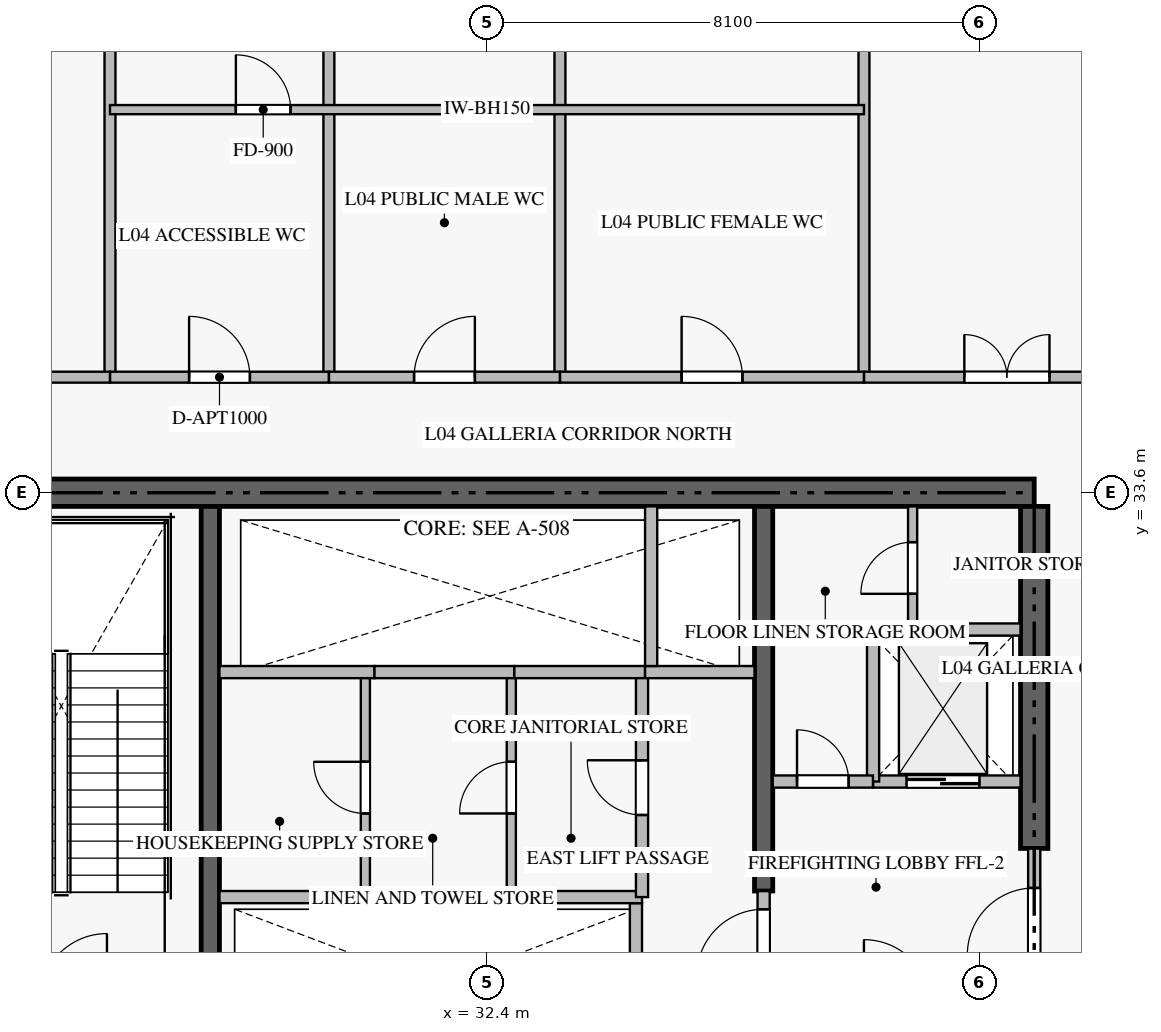
"""IFC4 building model, lengths in metres.
Left out: names, types, materials, properties, quantities, classifications, styles, units other than length and angle.
Written with IfcOpenShell. Run it as: python <this file> out.ifc"""

import sys

from ifc_helpers import new_model, si_unit, direction, frame, frame_2d, origin, place, context, subcontext, project, spatial, rectangle, extrude, source, transform, mapped, element, fill, save


model = new_model("IFC4")
c1 = context("Model", 3, precision=1e-05, world=origin(), true_north=direction((0.0, 1.0)))
c2 = subcontext(c1, "Body", "Model", "MODEL_VIEW")
j1 = project(units=[si_unit("LENGTHUNIT", "METRE"), si_unit("PLANEANGLEUNIT", "RADIAN")], contexts=[c1])
p1 = place(None, origin())
s1 = spatial("IfcSite", under=j1, at=p1, CompositionType="ELEMENT")
p2 = place(p1, origin())
s2 = spatial("IfcBuilding", under=s1, at=p2, CompositionType="ELEMENT")
p3 = place(p2, frame((0.0, 0.0, 21.0)))
s3 = spatial("IfcBuildingStorey", under=s2, at=p3, CompositionType="ELEMENT", Elevation=21.0)
p4 = place(p3, frame((41.4, 33.6, -0.85), z_axis=(0.0, 0.0, 1.0), x_axis=(-1.0, 0.0, 0.0)))
e1 = element("IfcWall", 1, at=p4, inside=s3, PredefinedType="SHEAR", context=c2, shape_type="SweptSolid", body=[
    extrude(rectangle(XDim=18.0, YDim=0.45, at=frame_2d((9.0, 0.0))), origin(), (0.0, 0.0, 1.0), 6.108),
])
p5 = place(p3, frame((41.4, 27.75, -0.85), z_axis=(0.0, 0.0, 1.0), x_axis=(0.0, 1.0, 0.0)))
e2 = element("IfcWall", 2, at=p5, inside=s3, PredefinedType="SHEAR", context=c2, shape_type="SweptSolid", body=[
    extrude(rectangle(XDim=5.625, YDim=0.45, at=frame_2d((2.812, 0.0))), origin(), (0.0, 0.0, 1.0), 6.108),
])
p6 = place(p3, frame((27.85, 23.55, -0.85), z_axis=(0.0, 0.0, 1.0), x_axis=(0.0, 1.0, 0.0)))
e3 = element("IfcWall", 3, at=p6, inside=s3, PredefinedType="SHEAR", context=c2, shape_type="SweptSolid", body=[
    extrude(rectangle(XDim=9.825, YDim=0.3, at=frame_2d((4.913, 0.0))), origin(), (0.0, 0.0, 1.0), 6.108),
])
p7 = place(p3, frame((36.95, 27.05, -0.85), z_axis=(0.0, 0.0, 1.0), x_axis=(0.0, 1.0, 0.0)))
e4 = element("IfcWall", 4, at=p7, inside=s3, PredefinedType="SHEAR", context=c2, shape_type="SweptSolid", body=[
    extrude(rectangle(XDim=6.325, YDim=0.3, at=frame_2d((3.163, 0.0))), origin(), (0.0, 0.0, 1.0), 6.108),
])
p8 = place(p3, frame((38.75, 28.85, 0.0), z_axis=(0.0, 0.0, 1.0), x_axis=(1.0, 0.0, 0.0)))
e5 = element("IfcWall", 5, at=p8, inside=s3, PredefinedType="STANDARD", context=c2, shape_type="SweptSolid", body=[
    extrude(rectangle(XDim=2.425, YDim=0.2, at=frame_2d((1.212, 0.0))), origin(), (0.0, 0.0, 1.0), 5.26),
])
p9 = place(p8, frame((0.55, 0.0, 0.0)))
e6 = element("IfcOpeningElement", 6, at=p9, cuts=e5, PredefinedType="OPENING", context=c2, shape_type="SweptSolid", body=[
    extrude(rectangle(XDim=1.2, YDim=2.2, at=frame_2d((0.6, 1.1))), frame((0.0, 0.11, 0.0), z_axis=(0.0, -1.0, 0.0), x_axis=(1.0, 0.0, 0.0)), (0.0, 0.0, 1.0), 0.22),
])
p10 = place(p3, frame((34.85, 24.35, 0.0), z_axis=(0.0, 0.0, 1.0), x_axis=(0.0, 1.0, 0.0)))
e7 = element("IfcWall", 7, at=p10, inside=s3, PredefinedType="STANDARD", context=c2, shape_type="SweptSolid", body=[
    extrude(rectangle(XDim=2.5, YDim=0.2, at=frame_2d((1.25, 0.0))), origin(), (0.0, 0.0, 1.0), 5.26),
])
p11 = place(p3, frame((28.0, 30.65, 0.0), z_axis=(0.0, 0.0, 1.0), x_axis=(1.0, 0.0, 0.0)))
e8 = element("IfcWall", 8, at=p11, inside=s3, PredefinedType="STANDARD", context=c2, shape_type="SweptSolid", body=[
    extrude(rectangle(XDim=2.55, YDim=0.2, at=frame_2d((1.275, 0.0))), origin(), (0.0, 0.0, 1.0), 5.26),
])
p12 = place(p3, frame((30.55, 30.65, 0.0), z_axis=(0.0, 0.0, 1.0), x_axis=(1.0, 0.0, 0.0)))
e9 = element("IfcWall", 9, at=p12, inside=s3, PredefinedType="STANDARD", context=c2, shape_type="SweptSolid", body=[
    extrude(rectangle(XDim=2.3, YDim=0.2, at=frame_2d((1.15, 0.0))), origin(), (0.0, 0.0, 1.0), 5.26),
])
p13 = place(p3, frame((32.85, 30.65, 0.0), z_axis=(0.0, 0.0, 1.0), x_axis=(1.0, 0.0, 0.0)))
e10 = element("IfcWall", 10, at=p13, inside=s3, PredefinedType="STANDARD", context=c2, shape_type="SweptSolid", body=[
    extrude(rectangle(XDim=2.15, YDim=0.2, at=frame_2d((1.075, 0.0))), origin(), (0.0, 0.0, 1.0), 5.26),
])
p14 = place(p3, frame((35.0, 30.65, 0.0), z_axis=(0.0, 0.0, 1.0), x_axis=(1.0, 0.0, 0.0)))
e11 = element("IfcWall", 11, at=p14, inside=s3, PredefinedType="STANDARD", context=c2, shape_type="SweptSolid", body=[
    extrude(rectangle(XDim=1.8, YDim=0.2, at=frame_2d((0.9, 0.0))), origin(), (0.0, 0.0, 1.0), 5.26),
])
p15 = place(p3, frame((35.1, 30.75, 0.0), z_axis=(0.0, 0.0, 1.0), x_axis=(0.0, 1.0, 0.0)))
e12 = element("IfcWall", 12, at=p15, inside=s3, PredefinedType="STANDARD", context=c2, shape_type="SweptSolid", body=[
    extrude(rectangle(XDim=2.625, YDim=0.2, at=frame_2d((1.312, 0.0))), origin(), (0.0, 0.0, 1.0), 5.26),
])
p16 = place(p3, frame((38.75, 28.85, 0.0), z_axis=(0.0, 0.0, 1.0), x_axis=(0.0, 1.0, 0.0)))
e13 = element("IfcWall", 13, at=p16, inside=s3, PredefinedType="STANDARD", context=c2, shape_type="SweptSolid", body=[
    extrude(rectangle(XDim=2.5, YDim=0.2, at=frame_2d((1.25, 0.0))), origin(), (0.0, 0.0, 1.0), 5.26),
])
p17 = place(p3, frame((38.75, 31.35, 0.0), z_axis=(0.0, 0.0, 1.0), x_axis=(1.0, 0.0, 0.0)))
e14 = element("IfcWall", 14, at=p17, inside=s3, PredefinedType="STANDARD", context=c2, shape_type="SweptSolid", body=[
    extrude(rectangle(XDim=2.425, YDim=0.2, at=frame_2d((1.212, 0.0))), origin(), (0.0, 0.0, 1.0), 5.26),
])
p18 = place(p3, frame((37.1, 28.85, 0.0), z_axis=(0.0, 0.0, 1.0), x_axis=(1.0, 0.0, 0.0)))
e15 = element("IfcWall", 15, at=p18, inside=s3, PredefinedType="STANDARD", context=c2, shape_type="SweptSolid", body=[
    extrude(rectangle(XDim=1.648, YDim=0.2, at=frame_2d((0.824, 0.0))), origin(), (0.0, 0.0, 1.0), 5.26),
])
p19 = place(p18, frame((0.399, 0.0, 0.0)))
e16 = element("IfcOpeningElement", 16, at=p19, cuts=e15, PredefinedType="OPENING", context=c2, shape_type="SweptSolid", body=[
    extrude(rectangle(XDim=0.85, YDim=2.1, at=frame_2d((0.425, 1.05))), frame((0.0, 0.11, 0.0), z_axis=(0.0, -1.0, 0.0), x_axis=(1.0, 0.0, 0.0)), (0.0, 0.0, 1.0), 0.22),
])
p20 = place(p3, frame((41.4, 25.352, 0.0), z_axis=(0.0, 0.0, 1.0), x_axis=(0.0, 1.0, 0.0)))
e17 = element("IfcWall", 17, at=p20, inside=s3, PredefinedType="STANDARD", context=c2, shape_type="SweptSolid", body=[
    extrude(rectangle(XDim=2.396, YDim=0.2, at=frame_2d((1.198, 0.0))), origin(), (0.0, 0.0, 1.0), 5.26),
])
p21 = place(p20, frame((0.648, 0.0, 0.0)))
e18 = element("IfcOpeningElement", 18, at=p21, cuts=e17, PredefinedType="OPENING", context=c2, shape_type="SweptSolid", body=[
    extrude(rectangle(XDim=1.1, YDim=2.15, at=frame_2d((0.55, 1.075))), frame((0.0, 0.11, 0.0), z_axis=(0.0, -1.0, 0.0), x_axis=(1.0, 0.0, 0.0)), (0.0, 0.0, 1.0), 0.22),
])
p22 = place(p3, frame((36.95, 25.352, 0.0), z_axis=(0.0, 0.0, 1.0), x_axis=(0.0, 1.0, 0.0)))
e19 = element("IfcWall", 19, at=p22, inside=s3, PredefinedType="STANDARD", context=c2, shape_type="SweptSolid", body=[
    extrude(rectangle(XDim=1.696, YDim=0.2, at=frame_2d((0.848, 0.0))), origin(), (0.0, 0.0, 1.0), 5.26),
])
p23 = place(p22, frame((0.298, 0.0, 0.0)))
e20 = element("IfcOpeningElement", 20, at=p23, cuts=e19, PredefinedType="OPENING", context=c2, shape_type="SweptSolid", body=[
    extrude(rectangle(XDim=1.1, YDim=2.15, at=frame_2d((0.55, 1.075))), frame((0.0, 0.11, 0.0), z_axis=(0.0, -1.0, 0.0), x_axis=(1.0, 0.0, 0.0)), (0.0, 0.0, 1.0), 0.22),
])
p24 = place(p3, frame((28.0, 26.95, 0.0), z_axis=(0.0, 0.0, 1.0), x_axis=(1.0, 0.0, 0.0)))
e21 = element("IfcWall", 21, at=p24, inside=s3, PredefinedType="STANDARD", context=c2, shape_type="SweptSolid", body=[
    extrude(rectangle(XDim=6.95, YDim=0.2, at=frame_2d((3.475, 0.0))), origin(), (0.0, 0.0, 1.0), 5.26),
])
p25 = place(p3, frame((39.4, 31.35, 0.0), z_axis=(0.0, 0.0, 1.0), x_axis=(0.0, 1.0, 0.0)))
e22 = element("IfcWall", 22, at=p25, inside=s3, PredefinedType="PARTITIONING", context=c2, shape_type="SweptSolid", body=[
    extrude(rectangle(XDim=2.025, YDim=0.15, at=frame_2d((1.012, 0.0))), origin(), (0.0, 0.0, 1.0), 5.26),
])
p26 = place(p25, frame((0.587, 0.0, 0.0)))
e23 = element("IfcOpeningElement", 23, at=p26, cuts=e22, PredefinedType="OPENING", context=c2, shape_type="SweptSolid", body=[
    extrude(rectangle(XDim=0.85, YDim=2.1, at=frame_2d((0.425, 1.05))), frame((0.0, 0.085, 0.0), z_axis=(0.0, -1.0, 0.0), x_axis=(1.0, 0.0, 0.0)), (0.0, 0.0, 1.0), 0.17),
])
p27 = place(p3, frame((34.95, 26.95, 0.0), z_axis=(0.0, 0.0, 1.0), x_axis=(0.0, 1.0, 0.0)))
e24 = element("IfcWall", 24, at=p27, inside=s3, PredefinedType="STANDARD", context=c2, shape_type="SweptSolid", body=[
    extrude(rectangle(XDim=3.6, YDim=0.2, at=frame_2d((1.8, 0.0))), origin(), (0.0, 0.0, 1.0), 5.26),
])
p28 = place(p27, frame((1.35, 0.0, 0.0)))
e25 = element("IfcOpeningElement", 25, at=p28, cuts=e24, PredefinedType="OPENING", context=c2, shape_type="SweptSolid", body=[
    extrude(rectangle(XDim=0.9, YDim=2.1, at=frame_2d((0.45, 1.05))), frame((0.0, 0.11, 0.0), z_axis=(0.0, -1.0, 0.0), x_axis=(1.0, 0.0, 0.0)), (0.0, 0.0, 1.0), 0.22),
])
p29 = place(p3, frame((32.8, 26.95, 0.0), z_axis=(0.0, 0.0, 1.0), x_axis=(0.0, 1.0, 0.0)))
e26 = element("IfcWall", 26, at=p29, inside=s3, PredefinedType="PARTITIONING", context=c2, shape_type="SweptSolid", body=[
    extrude(rectangle(XDim=3.6, YDim=0.15, at=frame_2d((1.8, 0.0))), origin(), (0.0, 0.0, 1.0), 5.26),
])
p30 = place(p29, frame((1.375, 0.0, 0.0)))
e27 = element("IfcOpeningElement", 27, at=p30, cuts=e26, PredefinedType="OPENING", context=c2, shape_type="SweptSolid", body=[
    extrude(rectangle(XDim=0.85, YDim=2.1, at=frame_2d((0.425, 1.05))), frame((0.0, 0.085, 0.0), z_axis=(0.0, -1.0, 0.0), x_axis=(1.0, 0.0, 0.0)), (0.0, 0.0, 1.0), 0.17),
])
p31 = place(p3, frame((30.4, 26.95, 0.0), z_axis=(0.0, 0.0, 1.0), x_axis=(0.0, 1.0, 0.0)))
e28 = element("IfcWall", 28, at=p31, inside=s3, PredefinedType="PARTITIONING", context=c2, shape_type="SweptSolid", body=[
    extrude(rectangle(XDim=3.6, YDim=0.15, at=frame_2d((1.8, 0.0))), origin(), (0.0, 0.0, 1.0), 5.26),
])
p32 = place(p31, frame((1.375, 0.0, 0.0)))
e29 = element("IfcOpeningElement", 29, at=p32, cuts=e28, PredefinedType="OPENING", context=c2, shape_type="SweptSolid", body=[
    extrude(rectangle(XDim=0.85, YDim=2.1, at=frame_2d((0.425, 1.05))), frame((0.0, 0.085, 0.0), z_axis=(0.0, -1.0, 0.0), x_axis=(1.0, 0.0, 0.0)), (0.0, 0.0, 1.0), 0.17),
])
for number, where, z_axis, x_axis in (
    (30, (26.2, 35.5, 0.0), (0.0, 0.0, 1.0), (0.0, 1.0, 0.0)),
    (31, (29.8, 35.5, 0.0), (0.0, 0.0, 1.0), (0.0, 1.0, 0.0)),
    (32, (33.6, 35.5, 0.0), (0.0, 0.0, 1.0), (0.0, 1.0, 0.0)),
    (33, (38.6, 35.5, 0.0), (0.0, 0.0, 1.0), (0.0, 1.0, 0.0)),
):
    element("IfcWall", number, at=place(p3, frame(where, z_axis=z_axis, x_axis=x_axis)), inside=s3, PredefinedType="PARTITIONING", context=c2, shape_type="SweptSolid", body=[
        extrude(rectangle(XDim=10.018, YDim=0.18, at=frame_2d((5.009, 0.0))), origin(), (0.0, 0.0, 1.0), 5.26),
    ])
p33 = place(p3, frame((21.5, 35.5, 0.0), z_axis=(0.0, 0.0, 1.0), x_axis=(1.0, 0.0, 0.0)))
e34 = element("IfcWall", 34, at=p33, inside=s3, PredefinedType="PARTITIONING", context=c2, shape_type="SweptSolid", body=[
    extrude(rectangle(XDim=4.7, YDim=0.18, at=frame_2d((2.35, 0.0))), origin(), (0.0, 0.0, 1.0), 5.26),
])
p34 = place(p33, frame((1.65, 0.0, 0.0)))
e35 = element("IfcOpeningElement", 35, at=p34, cuts=e34, PredefinedType="OPENING", context=c2, shape_type="SweptSolid", body=[
    extrude(rectangle(XDim=1.4, YDim=2.25, at=frame_2d((0.7, 1.125))), frame((0.0, 0.1, 0.0), z_axis=(0.0, -1.0, 0.0), x_axis=(1.0, 0.0, 0.0)), (0.0, 0.0, 1.0), 0.2),
])
p35 = place(p3, frame((26.202, 35.5, 0.0), z_axis=(0.0, 0.0, 1.0), x_axis=(1.0, 0.0, 0.0)))
e36 = element("IfcWall", 36, at=p35, inside=s3, PredefinedType="PARTITIONING", context=c2, shape_type="SweptSolid", body=[
    extrude(rectangle(XDim=3.598, YDim=0.18, at=frame_2d((1.799, 0.0))), origin(), (0.0, 0.0, 1.0), 5.26),
])
p36 = place(p35, frame((1.299, 0.0, 0.0)))
e37 = element("IfcOpeningElement", 37, at=p36, cuts=e36, PredefinedType="OPENING", context=c2, shape_type="SweptSolid", body=[
    extrude(rectangle(XDim=1.0, YDim=2.15, at=frame_2d((0.5, 1.075))), frame((0.0, 0.1, 0.0), z_axis=(0.0, -1.0, 0.0), x_axis=(1.0, 0.0, 0.0)), (0.0, 0.0, 1.0), 0.2),
])
p37 = place(p3, frame((29.802, 35.5, 0.0), z_axis=(0.0, 0.0, 1.0), x_axis=(1.0, 0.0, 0.0)))
e38 = element("IfcWall", 38, at=p37, inside=s3, PredefinedType="PARTITIONING", context=c2, shape_type="SweptSolid", body=[
    extrude(rectangle(XDim=3.798, YDim=0.18, at=frame_2d((1.899, 0.0))), origin(), (0.0, 0.0, 1.0), 5.26),
])
p38 = place(p37, frame((1.399, 0.0, 0.0)))
e39 = element("IfcOpeningElement", 39, at=p38, cuts=e38, PredefinedType="OPENING", context=c2, shape_type="SweptSolid", body=[
    extrude(rectangle(XDim=1.0, YDim=2.15, at=frame_2d((0.5, 1.075))), frame((0.0, 0.1, 0.0), z_axis=(0.0, -1.0, 0.0), x_axis=(1.0, 0.0, 0.0)), (0.0, 0.0, 1.0), 0.2),
])
p39 = place(p3, frame((33.602, 35.5, 0.0), z_axis=(0.0, 0.0, 1.0), x_axis=(1.0, 0.0, 0.0)))
e40 = element("IfcWall", 40, at=p39, inside=s3, PredefinedType="PARTITIONING", context=c2, shape_type="SweptSolid", body=[
    extrude(rectangle(XDim=4.998, YDim=0.18, at=frame_2d((2.499, 0.0))), origin(), (0.0, 0.0, 1.0), 5.26),
])
p40 = place(p39, frame((1.999, 0.0, 0.0)))
e41 = element("IfcOpeningElement", 41, at=p40, cuts=e40, PredefinedType="OPENING", context=c2, shape_type="SweptSolid", body=[
    extrude(rectangle(XDim=1.0, YDim=2.15, at=frame_2d((0.5, 1.075))), frame((0.0, 0.1, 0.0), z_axis=(0.0, -1.0, 0.0), x_axis=(1.0, 0.0, 0.0)), (0.0, 0.0, 1.0), 0.2),
])
p41 = place(p3, frame((38.602, 35.5, 0.0), z_axis=(0.0, 0.0, 1.0), x_axis=(1.0, 0.0, 0.0)))
e42 = element("IfcWall", 42, at=p41, inside=s3, PredefinedType="PARTITIONING", context=c2, shape_type="SweptSolid", body=[
    extrude(rectangle(XDim=4.698, YDim=0.18, at=frame_2d((2.349, 0.0))), origin(), (0.0, 0.0, 1.0), 5.26),
])
p42 = place(p41, frame((1.649, 0.0, 0.0)))
e43 = element("IfcOpeningElement", 43, at=p42, cuts=e42, PredefinedType="OPENING", context=c2, shape_type="SweptSolid", body=[
    extrude(rectangle(XDim=1.4, YDim=2.25, at=frame_2d((0.7, 1.125))), frame((0.0, 0.1, 0.0), z_axis=(0.0, -1.0, 0.0), x_axis=(1.0, 0.0, 0.0)), (0.0, 0.0, 1.0), 0.2),
])
p43 = place(p3, frame((26.2, 39.9, 0.0), z_axis=(0.0, 0.0, 1.0), x_axis=(1.0, 0.0, 0.0)))
e44 = element("IfcWall", 44, at=p43, inside=s3, PredefinedType="PARTITIONING", context=c2, shape_type="SweptSolid", body=[
    extrude(rectangle(XDim=12.4, YDim=0.15, at=frame_2d((6.2, 0.0))), origin(), (0.0, 0.0, 1.0), 5.26),
])
p44 = place(p43, frame((2.07, 0.0, 0.0)))
e45 = element("IfcOpeningElement", 45, at=p44, cuts=e44, PredefinedType="OPENING", context=c2, shape_type="SweptSolid", body=[
    extrude(rectangle(XDim=0.9, YDim=2.1, at=frame_2d((0.45, 1.05))), frame((0.0, 0.085, 0.0), z_axis=(0.0, -1.0, 0.0), x_axis=(1.0, 0.0, 0.0)), (0.0, 0.0, 1.0), 0.17),
])
m1 = source(origin(), c2, "Body", "SweptSolid", [
    extrude(rectangle(XDim=1.2, YDim=2.2, at=frame_2d((0.6, 1.1))), frame((0.0, 0.025, 0.0), z_axis=(0.0, -1.0, 0.0), x_axis=(1.0, 0.0, 0.0)), (0.0, 0.0, 1.0), 0.05),
])
p45 = place(p9, origin())
e46 = element("IfcDoor", 46, at=p45, inside=s3, OperationType="DOUBLE_DOOR_SLIDING", PredefinedType="DOOR", context=c2, shape_type="MappedRepresentation", body=[
    mapped(m1, transform((0.0, 0.0, 0.0), scale=1.0)),
])
fill(e6, e46)
m2 = source(origin(), c2, "Body", "SweptSolid", [
    extrude(rectangle(XDim=0.85, YDim=2.1, at=frame_2d((0.425, 1.05))), frame((0.0, 0.025, 0.0), z_axis=(0.0, -1.0, 0.0), x_axis=(1.0, 0.0, 0.0)), (0.0, 0.0, 1.0), 0.05),
])
p46 = place(p19, origin())
e47 = element("IfcDoor", 47, at=p46, inside=s3, OperationType="SINGLE_SWING_LEFT", PredefinedType="DOOR", context=c2, shape_type="MappedRepresentation", body=[
    mapped(m2, transform((0.0, 0.0, 0.0), scale=1.0)),
])
fill(e16, e47)
m3 = source(origin(), c2, "Body", "SweptSolid", [
    extrude(rectangle(XDim=1.1, YDim=2.15, at=frame_2d((0.55, 1.075))), frame((0.0, 0.025, 0.0), z_axis=(0.0, -1.0, 0.0), x_axis=(1.0, 0.0, 0.0)), (0.0, 0.0, 1.0), 0.05),
])
p47 = place(p21, origin())
e48 = element("IfcDoor", 48, at=p47, inside=s3, OperationType="SINGLE_SWING_LEFT", PredefinedType="DOOR", context=c2, shape_type="MappedRepresentation", body=[
    mapped(m3, transform((0.0, 0.0, 0.0), scale=1.0)),
])
fill(e18, e48)
p48 = place(p23, origin())
e49 = element("IfcDoor", 49, at=p48, inside=s3, OperationType="SINGLE_SWING_LEFT", PredefinedType="DOOR", context=c2, shape_type="MappedRepresentation", body=[
    mapped(m3, transform((0.0, 0.0, 0.0), scale=1.0)),
])
fill(e20, e49)
p49 = place(p26, origin())
e50 = element("IfcDoor", 50, at=p49, inside=s3, OperationType="SINGLE_SWING_LEFT", PredefinedType="DOOR", context=c2, shape_type="MappedRepresentation", body=[
    mapped(m2, transform((0.0, 0.0, 0.0), scale=1.0)),
])
fill(e23, e50)
m4 = source(origin(), c2, "Body", "SweptSolid", [
    extrude(rectangle(XDim=0.9, YDim=2.1, at=frame_2d((0.45, 1.05))), frame((0.0, 0.025, 0.0), z_axis=(0.0, -1.0, 0.0), x_axis=(1.0, 0.0, 0.0)), (0.0, 0.0, 1.0), 0.05),
])
p50 = place(p28, origin())
e51 = element("IfcDoor", 51, at=p50, inside=s3, OperationType="SINGLE_SWING_RIGHT", PredefinedType="DOOR", context=c2, shape_type="MappedRepresentation", body=[
    mapped(m4, transform((0.0, 0.0, 0.0), scale=1.0)),
])
fill(e25, e51)
p51 = place(p30, origin())
e52 = element("IfcDoor", 52, at=p51, inside=s3, OperationType="SINGLE_SWING_LEFT", PredefinedType="DOOR", context=c2, shape_type="MappedRepresentation", body=[
    mapped(m2, transform((0.0, 0.0, 0.0), scale=1.0)),
])
fill(e27, e52)
p52 = place(p32, origin())
e53 = element("IfcDoor", 53, at=p52, inside=s3, OperationType="SINGLE_SWING_RIGHT", PredefinedType="DOOR", context=c2, shape_type="MappedRepresentation", body=[
    mapped(m2, transform((0.0, 0.0, 0.0), scale=1.0)),
])
fill(e29, e53)
m5 = source(origin(), c2, "Body", "SweptSolid", [
    extrude(rectangle(XDim=1.0, YDim=2.15, at=frame_2d((0.5, 1.075))), frame((0.0, 0.025, 0.0), z_axis=(0.0, -1.0, 0.0), x_axis=(1.0, 0.0, 0.0)), (0.0, 0.0, 1.0), 0.05),
])
p53 = place(p36, origin())
e54 = element("IfcDoor", 54, at=p53, inside=s3, OperationType="SINGLE_SWING_LEFT", PredefinedType="DOOR", context=c2, shape_type="MappedRepresentation", body=[
    mapped(m5, transform((0.0, 0.0, 0.0), scale=1.0)),
])
fill(e37, e54)
p54 = place(p38, origin())
e55 = element("IfcDoor", 55, at=p54, inside=s3, OperationType="SINGLE_SWING_RIGHT", PredefinedType="DOOR", context=c2, shape_type="MappedRepresentation", body=[
    mapped(m5, transform((0.0, 0.0, 0.0), scale=1.0)),
])
fill(e39, e55)
p55 = place(p40, origin())
e56 = element("IfcDoor", 56, at=p55, inside=s3, OperationType="SINGLE_SWING_LEFT", PredefinedType="DOOR", context=c2, shape_type="MappedRepresentation", body=[
    mapped(m5, transform((0.0, 0.0, 0.0), scale=1.0)),
])
fill(e41, e56)
m6 = source(origin(), c2, "Body", "SweptSolid", [
    extrude(rectangle(XDim=1.4, YDim=2.25, at=frame_2d((0.7, 1.125))), frame((0.0, 0.025, 0.0), z_axis=(0.0, -1.0, 0.0), x_axis=(1.0, 0.0, 0.0)), (0.0, 0.0, 1.0), 0.05),
])
p56 = place(p42, origin())
e57 = element("IfcDoor", 57, at=p56, inside=s3, OperationType="DOUBLE_DOOR_SINGLE_SWING", PredefinedType="DOOR", context=c2, shape_type="MappedRepresentation", body=[
    mapped(m6, transform((0.0, 0.0, 0.0), scale=1.0)),
])
fill(e43, e57)
p57 = place(p44, origin())
e58 = element("IfcDoor", 58, at=p57, inside=s3, OperationType="SINGLE_SWING_LEFT", PredefinedType="DOOR", context=c2, shape_type="MappedRepresentation", body=[
    mapped(m4, transform((0.0, 0.0, 0.0), scale=1.0)),
])
fill(e45, e58)
save(model, sys.argv[1])
